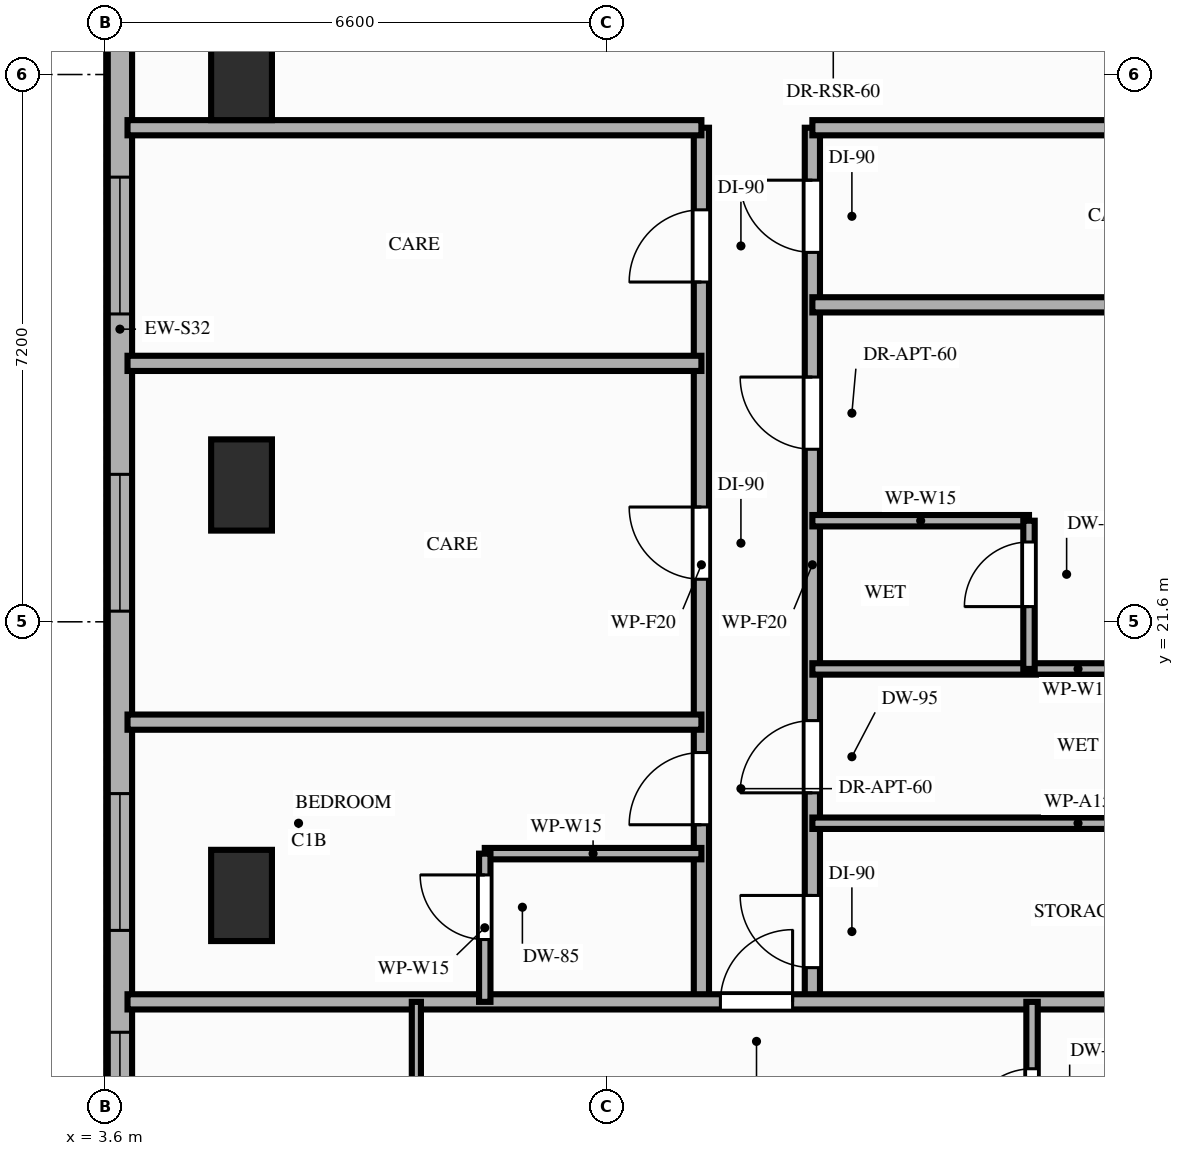
"""IFC4 building model, lengths in metres.
Left out: names, types, materials, properties, quantities, classifications, styles, units other than length and angle.
Written with IfcOpenShell. Run it as: python <this file> out.ifc"""

import sys

from ifc_helpers import new_model, si_unit, direction, frame, frame_2d, origin, origin_2d, place, context, subcontext, project, spatial, rectangle, extrude, element, fill, save


model = new_model("IFC4")
c1 = context("Model", 3, precision=1e-05, world=origin(), true_north=direction((0.0, 1.0)))
c2 = subcontext(c1, "Body", "Model", "MODEL_VIEW")
j1 = project(units=[si_unit("LENGTHUNIT", "METRE"), si_unit("PLANEANGLEUNIT", "RADIAN")], contexts=[c1])
p1 = place(None, origin())
s1 = spatial("IfcSite", under=j1, at=p1, CompositionType="ELEMENT")
p2 = place(p1, origin())
s2 = spatial("IfcBuilding", under=s1, at=p2, CompositionType="ELEMENT")
p3 = place(p2, frame((0.0, 0.0, 93.0)))
s3 = spatial("IfcBuildingStorey", under=s2, at=p3, CompositionType="ELEMENT", Elevation=93.0)
for number, where, z_axis, x_axis in (
    (1, (5.4, 18.0, 0.0), (0.0, 0.0, 1.0), (1.0, 0.0, 0.0)),
    (2, (5.4, 23.4, 0.0), (0.0, 0.0, 1.0), (1.0, 0.0, 0.0)),
    (3, (5.4, 28.8, 0.0), (0.0, 0.0, 1.0), (1.0, 0.0, 0.0)),
):
    element("IfcColumn", number, at=place(p3, frame(where, z_axis=z_axis, x_axis=x_axis)), inside=s3, PredefinedType="COLUMN", context=c2, shape_type="SweptSolid", body=[
        extrude(rectangle(XDim=0.8, YDim=1.2, at=origin_2d()), origin(), (0.0, 0.0, 1.0), 3.2),
    ])
p4 = place(p3, frame((3.8, 42.1, 0.0), z_axis=(0.0, 0.0, 1.0), x_axis=(0.0, -1.0, 0.0)))
e4 = element("IfcWall", 4, at=p4, inside=s3, PredefinedType="STANDARD", context=c2, shape_type="SweptSolid", body=[
    extrude(rectangle(XDim=33.3, YDim=0.32, at=frame_2d((16.65, 0.0))), origin(), (0.0, 0.0, 1.0), 2.7),
])
p5 = place(p4, frame((22.76, 0.0, 0.85)))
e5 = element("IfcOpeningElement", 5, at=p5, cuts=e4, PredefinedType="OPENING", context=c2, shape_type="SweptSolid", body=[
    extrude(rectangle(XDim=1.8, YDim=1.6, at=frame_2d((0.9, 0.8))), frame((0.0, 0.17, 0.0), z_axis=(0.0, -1.0, 0.0), x_axis=(1.0, 0.0, 0.0)), (0.0, 0.0, 1.0), 0.34),
])
p6 = place(p4, frame((18.56, 0.0, 0.85)))
e6 = element("IfcOpeningElement", 6, at=p6, cuts=e4, PredefinedType="OPENING", context=c2, shape_type="SweptSolid", body=[
    extrude(rectangle(XDim=1.8, YDim=1.6, at=frame_2d((0.9, 0.8))), frame((0.0, 0.17, 0.0), z_axis=(0.0, -1.0, 0.0), x_axis=(1.0, 0.0, 0.0)), (0.0, 0.0, 1.0), 0.34),
])
p7 = place(p4, frame((14.65, 0.0, 0.85)))
e7 = element("IfcOpeningElement", 7, at=p7, cuts=e4, PredefinedType="OPENING", context=c2, shape_type="SweptSolid", body=[
    extrude(rectangle(XDim=1.8, YDim=1.6, at=frame_2d((0.9, 0.8))), frame((0.0, 0.17, 0.0), z_axis=(0.0, -1.0, 0.0), x_axis=(1.0, 0.0, 0.0)), (0.0, 0.0, 1.0), 0.34),
])
p8 = place(p4, frame((28.43, 0.0, 0.85)))
e8 = element("IfcOpeningElement", 8, at=p8, cuts=e4, PredefinedType="OPENING", context=c2, shape_type="SweptSolid", body=[
    extrude(rectangle(XDim=1.8, YDim=1.6, at=frame_2d((0.9, 0.8))), frame((0.0, 0.17, 0.0), z_axis=(0.0, -1.0, 0.0), x_axis=(1.0, 0.0, 0.0)), (0.0, 0.0, 1.0), 0.34),
])
p9 = place(p4, frame((30.8, 0.0, 0.85)))
e9 = element("IfcOpeningElement", 9, at=p9, cuts=e4, PredefinedType="OPENING", context=c2, shape_type="SweptSolid", body=[
    extrude(rectangle(XDim=1.8, YDim=1.6, at=frame_2d((0.9, 0.8))), frame((0.0, 0.17, 0.0), z_axis=(0.0, -1.0, 0.0), x_axis=(1.0, 0.0, 0.0)), (0.0, 0.0, 1.0), 0.34),
])
p10 = place(p4, frame((25.9, 0.0, 0.85)))
e10 = element("IfcOpeningElement", 10, at=p10, cuts=e4, PredefinedType="OPENING", context=c2, shape_type="SweptSolid", body=[
    extrude(rectangle(XDim=1.8, YDim=1.6, at=frame_2d((0.9, 0.8))), frame((0.0, 0.17, 0.0), z_axis=(0.0, -1.0, 0.0), x_axis=(1.0, 0.0, 0.0)), (0.0, 0.0, 1.0), 0.34),
])
p11 = place(p4, frame((9.9, 0.0, 0.85)))
e11 = element("IfcOpeningElement", 11, at=p11, cuts=e4, PredefinedType="OPENING", context=c2, shape_type="SweptSolid", body=[
    extrude(rectangle(XDim=1.8, YDim=1.6, at=frame_2d((0.9, 0.8))), frame((0.0, 0.17, 0.0), z_axis=(0.0, -1.0, 0.0), x_axis=(1.0, 0.0, 0.0)), (0.0, 0.0, 1.0), 0.34),
])
p12 = place(p4, frame((3.8, 0.0, 0.85)))
e12 = element("IfcOpeningElement", 12, at=p12, cuts=e4, PredefinedType="OPENING", context=c2, shape_type="SweptSolid", body=[
    extrude(rectangle(XDim=1.8, YDim=1.6, at=frame_2d((0.9, 0.8))), frame((0.0, 0.17, 0.0), z_axis=(0.0, -1.0, 0.0), x_axis=(1.0, 0.0, 0.0)), (0.0, 0.0, 1.0), 0.34),
])
p13 = place(p3, frame((11.45, 16.6, 0.0), z_axis=(0.0, 0.0, 1.0), x_axis=(0.0, 1.0, 0.0)))
e13 = element("IfcWall", 13, at=p13, inside=s3, PredefinedType="PARTITIONING", context=c2, shape_type="SweptSolid", body=[
    extrude(rectangle(XDim=11.5, YDim=0.2, at=frame_2d((5.75, 0.0))), origin(), (0.0, 0.0, 1.0), 2.41),
])
p14 = place(p13, frame((2.33, 0.0, 0.0)))
e14 = element("IfcOpeningElement", 14, at=p14, cuts=e13, PredefinedType="OPENING", context=c2, shape_type="SweptSolid", body=[
    extrude(rectangle(XDim=0.95, YDim=2.15, at=frame_2d((0.475, 1.075))), frame((0.0, 0.11, 0.0), z_axis=(0.0, -1.0, 0.0), x_axis=(1.0, 0.0, 0.0)), (0.0, 0.0, 1.0), 0.22),
])
p15 = place(p13, frame((5.56, 0.0, 0.0)))
e15 = element("IfcOpeningElement", 15, at=p15, cuts=e13, PredefinedType="OPENING", context=c2, shape_type="SweptSolid", body=[
    extrude(rectangle(XDim=0.95, YDim=2.15, at=frame_2d((0.475, 1.075))), frame((0.0, 0.11, 0.0), z_axis=(0.0, -1.0, 0.0), x_axis=(1.0, 0.0, 0.0)), (0.0, 0.0, 1.0), 0.22),
])
p16 = place(p13, frame((9.47, 0.0, 0.0)))
e16 = element("IfcOpeningElement", 16, at=p16, cuts=e13, PredefinedType="OPENING", context=c2, shape_type="SweptSolid", body=[
    extrude(rectangle(XDim=0.95, YDim=2.15, at=frame_2d((0.475, 1.075))), frame((0.0, 0.11, 0.0), z_axis=(0.0, -1.0, 0.0), x_axis=(1.0, 0.0, 0.0)), (0.0, 0.0, 1.0), 0.22),
])
p17 = place(p3, frame((12.91, 16.6, 0.0), z_axis=(0.0, 0.0, 1.0), x_axis=(0.0, 1.0, 0.0)))
e17 = element("IfcWall", 17, at=p17, inside=s3, PredefinedType="PARTITIONING", context=c2, shape_type="SweptSolid", body=[
    extrude(rectangle(XDim=11.5, YDim=0.2, at=frame_2d((5.75, 0.0))), origin(), (0.0, 0.0, 1.0), 2.41),
])
p18 = place(p17, frame((0.45, 0.0, 0.0)))
e18 = element("IfcOpeningElement", 18, at=p18, cuts=e17, PredefinedType="OPENING", context=c2, shape_type="SweptSolid", body=[
    extrude(rectangle(XDim=0.95, YDim=2.15, at=frame_2d((0.475, 1.075))), frame((0.0, 0.11, 0.0), z_axis=(0.0, -1.0, 0.0), x_axis=(1.0, 0.0, 0.0)), (0.0, 0.0, 1.0), 0.22),
])
p19 = place(p17, frame((2.75, 0.0, 0.0)))
e19 = element("IfcOpeningElement", 19, at=p19, cuts=e17, PredefinedType="OPENING", context=c2, shape_type="SweptSolid", body=[
    extrude(rectangle(XDim=0.95, YDim=2.1, at=frame_2d((0.475, 1.05))), frame((0.0, 0.11, 0.0), z_axis=(0.0, -1.0, 0.0), x_axis=(1.0, 0.0, 0.0)), (0.0, 0.0, 1.0), 0.22),
])
p20 = place(p17, frame((9.86, 0.0, 0.0)))
e20 = element("IfcOpeningElement", 20, at=p20, cuts=e17, PredefinedType="OPENING", context=c2, shape_type="SweptSolid", body=[
    extrude(rectangle(XDim=0.95, YDim=2.15, at=frame_2d((0.475, 1.075))), frame((0.0, 0.11, 0.0), z_axis=(0.0, -1.0, 0.0), x_axis=(1.0, 0.0, 0.0)), (0.0, 0.0, 1.0), 0.22),
])
p21 = place(p17, frame((7.27, 0.0, 0.0)))
e21 = element("IfcOpeningElement", 21, at=p21, cuts=e17, PredefinedType="OPENING", context=c2, shape_type="SweptSolid", body=[
    extrude(rectangle(XDim=0.95, YDim=2.15, at=frame_2d((0.475, 1.075))), frame((0.0, 0.11, 0.0), z_axis=(0.0, -1.0, 0.0), x_axis=(1.0, 0.0, 0.0)), (0.0, 0.0, 1.0), 0.22),
])
p22 = place(p3, frame((3.9, 16.6, 0.0), z_axis=(0.0, 0.0, 1.0), x_axis=(1.0, 0.0, 0.0)))
e22 = element("IfcWall", 22, at=p22, inside=s3, PredefinedType="PARTITIONING", context=c2, shape_type="SweptSolid", body=[
    extrude(rectangle(XDim=16.0, YDim=0.2, at=frame_2d((8.0, 0.0))), origin(), (0.0, 0.0, 1.0), 2.41),
])
p23 = place(p22, frame((7.8, 0.0, 0.0)))
e23 = element("IfcOpeningElement", 23, at=p23, cuts=e22, PredefinedType="OPENING", context=c2, shape_type="SweptSolid", body=[
    extrude(rectangle(XDim=0.95, YDim=2.15, at=frame_2d((0.475, 1.075))), frame((0.0, 0.11, 0.0), z_axis=(0.0, -1.0, 0.0), x_axis=(1.0, 0.0, 0.0)), (0.0, 0.0, 1.0), 0.22),
])
p24 = place(p3, frame((3.9, 28.1, 0.0), z_axis=(0.0, 0.0, 1.0), x_axis=(1.0, 0.0, 0.0)))
e24 = element("IfcWall", 24, at=p24, inside=s3, PredefinedType="PARTITIONING", context=c2, shape_type="SweptSolid", body=[
    extrude(rectangle(XDim=7.55, YDim=0.2, at=frame_2d((3.775, 0.0))), origin(), (0.0, 0.0, 1.0), 2.41),
])
p25 = place(p3, frame((12.91, 28.1, 0.0), z_axis=(0.0, 0.0, 1.0), x_axis=(1.0, 0.0, 0.0)))
e25 = element("IfcWall", 25, at=p25, inside=s3, PredefinedType="PARTITIONING", context=c2, shape_type="SweptSolid", body=[
    extrude(rectangle(XDim=6.99, YDim=0.2, at=frame_2d((3.495, 0.0))), origin(), (0.0, 0.0, 1.0), 2.41),
])
p26 = place(p3, frame((8.6, 18.55, 0.0), z_axis=(0.0, 0.0, 1.0), x_axis=(1.0, 0.0, 0.0)))
e26 = element("IfcWall", 26, at=p26, inside=s3, PredefinedType="PARTITIONING", context=c2, shape_type="SweptSolid", body=[
    extrude(rectangle(XDim=2.85, YDim=0.15, at=frame_2d((1.425, 0.0))), origin(), (0.0, 0.0, 1.0), 3.02),
])
p27 = place(p3, frame((8.6, 16.6, 0.0), z_axis=(0.0, 0.0, 1.0), x_axis=(0.0, 1.0, 0.0)))
e27 = element("IfcWall", 27, at=p27, inside=s3, PredefinedType="PARTITIONING", context=c2, shape_type="SweptSolid", body=[
    extrude(rectangle(XDim=1.95, YDim=0.15, at=frame_2d((0.975, 0.0))), origin(), (0.0, 0.0, 1.0), 2.41),
])
p28 = place(p27, frame((0.82, 0.0, 0.0)))
e28 = element("IfcOpeningElement", 28, at=p28, cuts=e27, PredefinedType="OPENING", context=c2, shape_type="SweptSolid", body=[
    extrude(rectangle(XDim=0.85, YDim=2.1, at=frame_2d((0.425, 1.05))), frame((0.0, 0.085, 0.0), z_axis=(0.0, -1.0, 0.0), x_axis=(1.0, 0.0, 0.0)), (0.0, 0.0, 1.0), 0.17),
])
for number, where, z_axis, x_axis in (
    (29, (3.9, 20.28, 0.0), (0.0, 0.0, 1.0), (1.0, 0.0, 0.0)),
    (30, (3.9, 25.0, 0.0), (0.0, 0.0, 1.0), (1.0, 0.0, 0.0)),
):
    element("IfcWall", number, at=place(p3, frame(where, z_axis=z_axis, x_axis=x_axis)), inside=s3, PredefinedType="PARTITIONING", context=c2, shape_type="SweptSolid", body=[
        extrude(rectangle(XDim=7.55, YDim=0.2, at=frame_2d((3.775, 0.0))), origin(), (0.0, 0.0, 1.0), 2.41),
    ])
p29 = place(p3, frame((7.7, 8.7, 0.0), z_axis=(0.0, 0.0, 1.0), x_axis=(0.0, 1.0, 0.0)))
e31 = element("IfcWall", 31, at=p29, inside=s3, PredefinedType="PARTITIONING", context=c2, shape_type="SweptSolid", body=[
    extrude(rectangle(XDim=7.9, YDim=0.12, at=frame_2d((3.95, 0.0))), origin(), (0.0, 0.0, 1.0), 2.41),
])
p30 = place(p29, frame((3.56, 0.0, 0.0)))
e32 = element("IfcOpeningElement", 32, at=p30, cuts=e31, PredefinedType="OPENING", context=c2, shape_type="SweptSolid", body=[
    extrude(rectangle(XDim=0.95, YDim=2.15, at=frame_2d((0.475, 1.075))), frame((0.0, 0.07, 0.0), z_axis=(0.0, -1.0, 0.0), x_axis=(1.0, 0.0, 0.0)), (0.0, 0.0, 1.0), 0.14),
])
p31 = place(p3, frame((15.8, 8.7, 0.0), z_axis=(0.0, 0.0, 1.0), x_axis=(0.0, 1.0, 0.0)))
e33 = element("IfcWall", 33, at=p31, inside=s3, PredefinedType="PARTITIONING", context=c2, shape_type="SweptSolid", body=[
    extrude(rectangle(XDim=7.9, YDim=0.15, at=frame_2d((3.95, 0.0))), origin(), (0.0, 0.0, 1.0), 2.41),
])
p32 = place(p31, frame((2.14, 0.0, 0.0)))
e34 = element("IfcOpeningElement", 34, at=p32, cuts=e33, PredefinedType="OPENING", context=c2, shape_type="SweptSolid", body=[
    extrude(rectangle(XDim=0.95, YDim=2.15, at=frame_2d((0.475, 1.075))), frame((0.0, 0.085, 0.0), z_axis=(0.0, -1.0, 0.0), x_axis=(1.0, 0.0, 0.0)), (0.0, 0.0, 1.0), 0.17),
])
p33 = place(p31, frame((6.17, 0.0, 0.0)))
e35 = element("IfcOpeningElement", 35, at=p33, cuts=e33, PredefinedType="OPENING", context=c2, shape_type="SweptSolid", body=[
    extrude(rectangle(XDim=0.85, YDim=2.1, at=frame_2d((0.425, 1.05))), frame((0.0, 0.085, 0.0), z_axis=(0.0, -1.0, 0.0), x_axis=(1.0, 0.0, 0.0)), (0.0, 0.0, 1.0), 0.17),
])
for number, where, z_axis, x_axis in (
    (36, (12.91, 18.95, 0.0), (0.0, 0.0, 1.0), (1.0, 0.0, 0.0)),
    (37, (12.91, 20.98, 0.0), (0.0, 0.0, 1.0), (1.0, 0.0, 0.0)),
):
    element("IfcWall", number, at=place(p3, frame(where, z_axis=z_axis, x_axis=x_axis)), inside=s3, PredefinedType="PARTITIONING", context=c2, shape_type="SweptSolid", body=[
        extrude(rectangle(XDim=6.99, YDim=0.15, at=frame_2d((3.495, 0.0))), origin(), (0.0, 0.0, 1.0), 2.41),
    ])
p34 = place(p3, frame((12.91, 25.77, 0.0), z_axis=(0.0, 0.0, 1.0), x_axis=(1.0, 0.0, 0.0)))
e38 = element("IfcWall", 38, at=p34, inside=s3, PredefinedType="PARTITIONING", context=c2, shape_type="SweptSolid", body=[
    extrude(rectangle(XDim=6.99, YDim=0.2, at=frame_2d((3.495, 0.0))), origin(), (0.0, 0.0, 1.0), 2.41),
])
p35 = place(p3, frame((12.91, 22.93, 0.0), z_axis=(0.0, 0.0, 1.0), x_axis=(1.0, 0.0, 0.0)))
e39 = element("IfcWall", 39, at=p35, inside=s3, PredefinedType="PARTITIONING", context=c2, shape_type="SweptSolid", body=[
    extrude(rectangle(XDim=2.85, YDim=0.15, at=frame_2d((1.425, 0.0))), origin(), (0.0, 0.0, 1.0), 3.02),
])
p36 = place(p3, frame((15.76, 20.98, 0.0), z_axis=(0.0, 0.0, 1.0), x_axis=(0.0, 1.0, 0.0)))
e40 = element("IfcWall", 40, at=p36, inside=s3, PredefinedType="PARTITIONING", context=c2, shape_type="SweptSolid", body=[
    extrude(rectangle(XDim=1.95, YDim=0.15, at=frame_2d((0.975, 0.0))), origin(), (0.0, 0.0, 1.0), 2.6),
])
p37 = place(p36, frame((0.82, 0.0, 0.0)))
e41 = element("IfcOpeningElement", 41, at=p37, cuts=e40, PredefinedType="OPENING", context=c2, shape_type="SweptSolid", body=[
    extrude(rectangle(XDim=0.85, YDim=2.1, at=frame_2d((0.425, 1.05))), frame((0.0, 0.085, 0.0), z_axis=(0.0, -1.0, 0.0), x_axis=(1.0, 0.0, 0.0)), (0.0, 0.0, 1.0), 0.17),
])
p38 = place(p5, origin())
e42 = element("IfcWindow", 42, at=p38, inside=s3, PartitioningType="SINGLE_PANEL", PredefinedType="WINDOW", context=c2, shape_type="SweptSolid", body=[
    extrude(rectangle(XDim=1.8, YDim=1.6, at=frame_2d((0.9, 0.8))), frame((0.0, 0.03, 0.0), z_axis=(0.0, -1.0, 0.0), x_axis=(1.0, 0.0, 0.0)), (0.0, 0.0, 1.0), 0.06),
])
fill(e5, e42)
p39 = place(p6, origin())
e43 = element("IfcWindow", 43, at=p39, inside=s3, PartitioningType="SINGLE_PANEL", PredefinedType="WINDOW", context=c2, shape_type="SweptSolid", body=[
    extrude(rectangle(XDim=1.8, YDim=1.6, at=frame_2d((0.9, 0.8))), frame((0.0, 0.03, 0.0), z_axis=(0.0, -1.0, 0.0), x_axis=(1.0, 0.0, 0.0)), (0.0, 0.0, 1.0), 0.06),
])
fill(e6, e43)
p40 = place(p7, origin())
e44 = element("IfcWindow", 44, at=p40, inside=s3, PartitioningType="SINGLE_PANEL", PredefinedType="WINDOW", context=c2, shape_type="SweptSolid", body=[
    extrude(rectangle(XDim=1.8, YDim=1.6, at=frame_2d((0.9, 0.8))), frame((0.0, 0.03, 0.0), z_axis=(0.0, -1.0, 0.0), x_axis=(1.0, 0.0, 0.0)), (0.0, 0.0, 1.0), 0.06),
])
fill(e7, e44)
p41 = place(p10, origin())
e45 = element("IfcWindow", 45, at=p41, inside=s3, PartitioningType="SINGLE_PANEL", PredefinedType="WINDOW", context=c2, shape_type="SweptSolid", body=[
    extrude(rectangle(XDim=1.8, YDim=1.6, at=frame_2d((0.9, 0.8))), frame((0.0, 0.03, 0.0), z_axis=(0.0, -1.0, 0.0), x_axis=(1.0, 0.0, 0.0)), (0.0, 0.0, 1.0), 0.06),
])
fill(e10, e45)
p42 = place(p28, origin())
e46 = element("IfcDoor", 46, at=p42, inside=s3, OperationType="SINGLE_SWING_RIGHT", PredefinedType="DOOR", context=c2, shape_type="SweptSolid", body=[
    extrude(rectangle(XDim=0.85, YDim=2.1, at=frame_2d((0.425, 1.05))), frame((0.0, 0.025, 0.0), z_axis=(0.0, -1.0, 0.0), x_axis=(1.0, 0.0, 0.0)), (0.0, 0.0, 1.0), 0.05),
])
fill(e28, e46)
p43 = place(p14, origin())
e47 = element("IfcDoor", 47, at=p43, inside=s3, OperationType="SINGLE_SWING_LEFT", PredefinedType="DOOR", context=c2, shape_type="SweptSolid", body=[
    extrude(rectangle(XDim=0.95, YDim=2.15, at=frame_2d((0.475, 1.075))), frame((0.0, 0.025, 0.0), z_axis=(0.0, -1.0, 0.0), x_axis=(1.0, 0.0, 0.0)), (0.0, 0.0, 1.0), 0.05),
])
fill(e14, e47)
p44 = place(p15, origin())
e48 = element("IfcDoor", 48, at=p44, inside=s3, OperationType="SINGLE_SWING_RIGHT", PredefinedType="DOOR", context=c2, shape_type="SweptSolid", body=[
    extrude(rectangle(XDim=0.95, YDim=2.15, at=frame_2d((0.475, 1.075))), frame((0.0, 0.025, 0.0), z_axis=(0.0, -1.0, 0.0), x_axis=(1.0, 0.0, 0.0)), (0.0, 0.0, 1.0), 0.05),
])
fill(e15, e48)
p45 = place(p16, origin())
e49 = element("IfcDoor", 49, at=p45, inside=s3, OperationType="SINGLE_SWING_LEFT", PredefinedType="DOOR", context=c2, shape_type="SweptSolid", body=[
    extrude(rectangle(XDim=0.95, YDim=2.15, at=frame_2d((0.475, 1.075))), frame((0.0, 0.025, 0.0), z_axis=(0.0, -1.0, 0.0), x_axis=(1.0, 0.0, 0.0)), (0.0, 0.0, 1.0), 0.05),
])
fill(e16, e49)
p46 = place(p23, origin())
e50 = element("IfcDoor", 50, at=p46, inside=s3, OperationType="SINGLE_SWING_RIGHT", PredefinedType="DOOR", context=c2, shape_type="SweptSolid", body=[
    extrude(rectangle(XDim=0.95, YDim=2.15, at=frame_2d((0.475, 1.075))), frame((0.0, 0.025, 0.0), z_axis=(0.0, -1.0, 0.0), x_axis=(1.0, 0.0, 0.0)), (0.0, 0.0, 1.0), 0.05),
])
fill(e23, e50)
p47 = place(p33, origin())
e51 = element("IfcDoor", 51, at=p47, inside=s3, OperationType="SINGLE_SWING_LEFT", PredefinedType="DOOR", context=c2, shape_type="SweptSolid", body=[
    extrude(rectangle(XDim=0.85, YDim=2.1, at=frame_2d((0.425, 1.05))), frame((0.0, 0.025, 0.0), z_axis=(0.0, -1.0, 0.0), x_axis=(1.0, 0.0, 0.0)), (0.0, 0.0, 1.0), 0.05),
])
fill(e35, e51)
p48 = place(p18, origin())
e52 = element("IfcDoor", 52, at=p48, inside=s3, OperationType="SINGLE_SWING_RIGHT", PredefinedType="DOOR", context=c2, shape_type="SweptSolid", body=[
    extrude(rectangle(XDim=0.95, YDim=2.15, at=frame_2d((0.475, 1.075))), frame((0.0, 0.025, 0.0), z_axis=(0.0, -1.0, 0.0), x_axis=(1.0, 0.0, 0.0)), (0.0, 0.0, 1.0), 0.05),
])
fill(e18, e52)
p49 = place(p19, origin())
e53 = element("IfcDoor", 53, at=p49, inside=s3, OperationType="SINGLE_SWING_LEFT", PredefinedType="DOOR", context=c2, shape_type="SweptSolid", body=[
    extrude(rectangle(XDim=0.95, YDim=2.1, at=frame_2d((0.475, 1.05))), frame((0.0, 0.025, 0.0), z_axis=(0.0, -1.0, 0.0), x_axis=(1.0, 0.0, 0.0)), (0.0, 0.0, 1.0), 0.05),
])
fill(e19, e53)
p50 = place(p20, origin())
e54 = element("IfcDoor", 54, at=p50, inside=s3, OperationType="SINGLE_SWING_RIGHT", PredefinedType="DOOR", context=c2, shape_type="SweptSolid", body=[
    extrude(rectangle(XDim=0.95, YDim=2.15, at=frame_2d((0.475, 1.075))), frame((0.0, 0.025, 0.0), z_axis=(0.0, -1.0, 0.0), x_axis=(1.0, 0.0, 0.0)), (0.0, 0.0, 1.0), 0.05),
])
fill(e20, e54)
p51 = place(p37, origin())
e55 = element("IfcDoor", 55, at=p51, inside=s3, OperationType="SINGLE_SWING_LEFT", PredefinedType="DOOR", context=c2, shape_type="SweptSolid", body=[
    extrude(rectangle(XDim=0.85, YDim=2.1, at=frame_2d((0.425, 1.05))), frame((0.0, 0.025, 0.0), z_axis=(0.0, -1.0, 0.0), x_axis=(1.0, 0.0, 0.0)), (0.0, 0.0, 1.0), 0.05),
])
fill(e41, e55)
p52 = place(p21, origin())
e56 = element("IfcDoor", 56, at=p52, inside=s3, OperationType="SINGLE_SWING_RIGHT", PredefinedType="DOOR", context=c2, shape_type="SweptSolid", body=[
    extrude(rectangle(XDim=0.95, YDim=2.15, at=frame_2d((0.475, 1.075))), frame((0.0, 0.025, 0.0), z_axis=(0.0, -1.0, 0.0), x_axis=(1.0, 0.0, 0.0)), (0.0, 0.0, 1.0), 0.05),
])
fill(e21, e56)
save(model, sys.argv[1])
